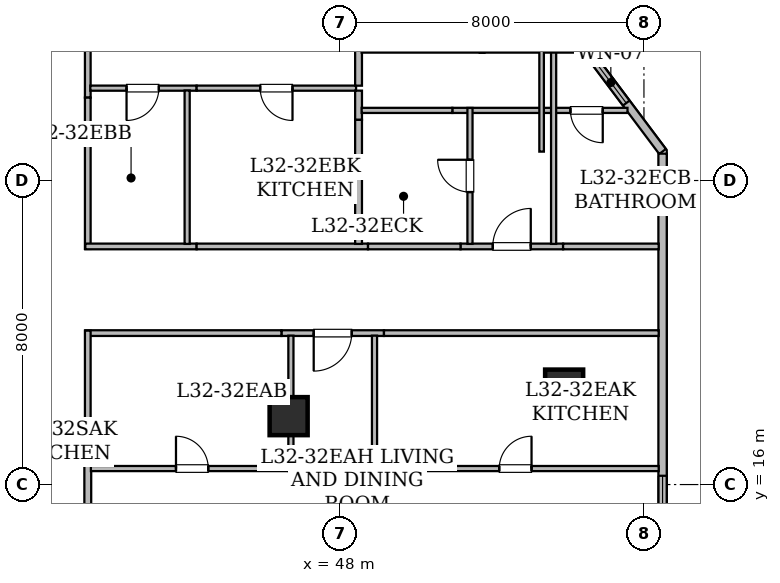
"""IFC4 building model, lengths in metres.
Left out: names, types, materials, properties, quantities, classifications, styles, units other than length and angle.
Written with IfcOpenShell. Run it as: python <this file> out.ifc"""

import sys

from ifc_helpers import new_model, si_unit, direction, frame, frame_2d, origin, origin_2d, place, context, subcontext, project, spatial, rectangle, hollow_rectangle, extrude, element, fill, save


model = new_model("IFC4")
c1 = context("Model", 3, precision=1e-05, world=origin(), true_north=direction((0.0, 1.0)))
c2 = subcontext(c1, "Body", "Model", "MODEL_VIEW")
j1 = project(units=[si_unit("LENGTHUNIT", "METRE"), si_unit("PLANEANGLEUNIT", "RADIAN")], contexts=[c1])
p1 = place(None, origin())
s1 = spatial("IfcSite", under=j1, at=p1, CompositionType="ELEMENT")
p2 = place(p1, origin())
s2 = spatial("IfcBuilding", under=s1, at=p2, CompositionType="ELEMENT")
p3 = place(p2, frame((0.0, 0.0, 127.45)))
s3 = spatial("IfcBuildingStorey", under=s2, at=p3, CompositionType="ELEMENT", Elevation=127.45)
for number, where, z_axis, x_axis in (
    (1, (53.9, 18.525, 0.0), (0.0, 0.0, 1.0), (1.0, 0.0, 0.0)),
    (2, (46.65, 17.8, 0.0), (0.0, 0.0, 1.0), (1.0, 0.0, 0.0)),
):
    element("IfcColumn", number, at=place(p3, frame(where, z_axis=z_axis, x_axis=x_axis)), inside=s3, PredefinedType="COLUMN", context=c2, shape_type="SweptSolid", body=[
        extrude(hollow_rectangle(XDim=1.0, YDim=1.0, WallThickness=0.05, at=origin_2d()), origin(), (0.0, 0.0, 1.0), 3.65),
    ])
p4 = place(p3, frame((54.119, 27.924, 0.0), z_axis=(0.0, 0.0, 1.0), x_axis=(0.600039540588, -0.799970343032, 0.0)))
e3 = element("IfcWall", 3, at=p4, inside=s3, PredefinedType="STANDARD", context=c2, shape_type="SweptSolid", body=[
    extrude(rectangle(XDim=3.952, YDim=0.22, at=frame_2d((1.976, 0.0))), origin(), (0.0, 0.0, 1.0), 3.43),
])
p5 = place(p4, frame((1.008, 0.0, 0.85)))
e4 = element("IfcOpeningElement", 4, at=p5, cuts=e3, PredefinedType="OPENING", context=c2, shape_type="SweptSolid", body=[
    extrude(rectangle(XDim=1.35, YDim=1.5, at=frame_2d((0.675, 0.75))), frame((0.0, 0.12, 0.0), z_axis=(0.0, -1.0, 0.0), x_axis=(1.0, 0.0, 0.0)), (0.0, 0.0, 1.0), 0.24),
])
p6 = place(p3, frame((56.49, 24.707, 0.0), z_axis=(0.0, 0.0, 1.0), x_axis=(0.0, -1.0, 0.0)))
e5 = element("IfcWall", 5, at=p6, inside=s3, PredefinedType="STANDARD", context=c2, shape_type="SweptSolid", body=[
    extrude(rectangle(XDim=14.061, YDim=0.22, at=frame_2d((7.031, 0.0))), origin(), (0.0, 0.0, 1.0), 3.43),
])
p7 = place(p6, frame((8.476, 0.0, 0.8)))
e6 = element("IfcOpeningElement", 6, at=p7, cuts=e5, PredefinedType="OPENING", context=c2, shape_type="SweptSolid", body=[
    extrude(rectangle(XDim=1.2, YDim=1.5, at=frame_2d((0.6, 0.75))), frame((0.0, 0.12, 0.0), z_axis=(0.0, -1.0, 0.0), x_axis=(1.0, 0.0, 0.0)), (0.0, 0.0, 1.0), 0.24),
])
p8 = place(p6, frame((10.746, 0.0, 0.85)))
e7 = element("IfcOpeningElement", 7, at=p8, cuts=e5, PredefinedType="OPENING", context=c2, shape_type="SweptSolid", body=[
    extrude(rectangle(XDim=1.65, YDim=1.55, at=frame_2d((0.825, 0.775))), frame((0.0, 0.12, 0.0), z_axis=(0.0, -1.0, 0.0), x_axis=(1.0, 0.0, 0.0)), (0.0, 0.0, 1.0), 0.24),
])
p9 = place(p3, frame((41.3, 16.835, 0.0), z_axis=(0.0, 0.0, 1.0), x_axis=(-1.0, 0.0, 0.0)))
e8 = element("IfcWall", 8, at=p9, inside=s3, PredefinedType="STANDARD", context=c2, shape_type="SweptSolid", body=[
    extrude(rectangle(XDim=1.636, YDim=0.15, at=frame_2d((0.818, 0.0))), origin(), (0.0, 0.0, 1.0), 3.43),
])
p10 = place(p3, frame((49.159, 19.985, 0.0), z_axis=(0.0, 0.0, 1.0), x_axis=(-1.0, 0.0, 0.0)))
e9 = element("IfcWall", 9, at=p10, inside=s3, PredefinedType="STANDARD", context=c2, shape_type="SweptSolid", body=[
    extrude(rectangle(XDim=2.698, YDim=0.15, at=frame_2d((1.349, 0.0))), origin(), (0.0, 0.0, 1.0), 2.647),
])
p11 = place(p10, frame((0.849, 0.0, 0.0)))
e10 = element("IfcOpeningElement", 10, at=p11, cuts=e9, PredefinedType="OPENING", context=c2, shape_type="SweptSolid", body=[
    extrude(rectangle(XDim=1.0, YDim=2.15, at=frame_2d((0.5, 1.075))), frame((0.0, 0.085, 0.0), z_axis=(0.0, -1.0, 0.0), x_axis=(1.0, 0.0, 0.0)), (0.0, 0.0, 1.0), 0.17),
])
p12 = place(p3, frame((46.461, 19.985, 0.0), z_axis=(0.0, 0.0, 1.0), x_axis=(-1.0, 0.0, 0.0)))
e11 = element("IfcWall", 11, at=p12, inside=s3, PredefinedType="STANDARD", context=c2, shape_type="SweptSolid", body=[
    extrude(rectangle(XDim=5.161, YDim=0.15, at=frame_2d((2.581, 0.0))), origin(), (0.0, 0.0, 1.0), 2.647),
])
p13 = place(p3, frame((41.365, 20.05, 0.0), z_axis=(0.0, 0.0, 1.0), x_axis=(0.0, -1.0, 0.0)))
e12 = element("IfcWall", 12, at=p13, inside=s3, PredefinedType="STANDARD", context=c2, shape_type="SweptSolid", body=[
    extrude(rectangle(XDim=3.15, YDim=0.15, at=frame_2d((1.575, 0.0))), origin(), (0.0, 0.0, 1.0), 2.647),
])
p14 = place(p3, frame((56.388, 19.985, 0.0), z_axis=(0.0, 0.0, 1.0), x_axis=(-1.0, 0.0, 0.0)))
e13 = element("IfcWall", 13, at=p14, inside=s3, PredefinedType="STANDARD", context=c2, shape_type="SweptSolid", body=[
    extrude(rectangle(XDim=7.229, YDim=0.15, at=frame_2d((3.615, 0.0))), origin(), (0.0, 0.0, 1.0), 2.876),
])
p15 = place(p3, frame((41.365, 35.279, 0.0), z_axis=(0.0, 0.0, 1.0), x_axis=(0.0, -1.0, 0.0)))
e14 = element("IfcWall", 14, at=p15, inside=s3, PredefinedType="STANDARD", context=c2, shape_type="SweptSolid", body=[
    extrude(rectangle(XDim=9.098, YDim=0.15, at=frame_2d((4.549, 0.0))), origin(), (0.0, 0.0, 1.0), 3.107),
])
p16 = place(p15, frame((4.049, 0.0, 0.0)))
e15 = element("IfcOpeningElement", 15, at=p16, cuts=e14, PredefinedType="OPENING", context=c2, shape_type="SweptSolid", body=[
    extrude(rectangle(XDim=1.0, YDim=2.15, at=frame_2d((0.5, 1.075))), frame((0.0, 0.085, 0.0), z_axis=(0.0, -1.0, 0.0), x_axis=(1.0, 0.0, 0.0)), (0.0, 0.0, 1.0), 0.17),
])
p17 = place(p3, frame((41.365, 26.181, 0.0), z_axis=(0.0, 0.0, 1.0), x_axis=(0.0, -1.0, 0.0)))
e16 = element("IfcWall", 16, at=p17, inside=s3, PredefinedType="STANDARD", context=c2, shape_type="SweptSolid", body=[
    extrude(rectangle(XDim=3.981, YDim=0.15, at=frame_2d((1.99, 0.0))), origin(), (0.0, 0.0, 1.0), 3.43),
])
p18 = place(p3, frame((41.3, 22.265, 0.0), z_axis=(0.0, 0.0, 1.0), x_axis=(1.0, 0.0, 0.0)))
e17 = element("IfcWall", 17, at=p18, inside=s3, PredefinedType="STANDARD", context=c2, shape_type="SweptSolid", body=[
    extrude(rectangle(XDim=2.929, YDim=0.15, at=frame_2d((1.464, 0.0))), origin(), (0.0, 0.0, 1.0), 3.43),
])
p19 = place(p3, frame((44.229, 22.265, 0.0), z_axis=(0.0, 0.0, 1.0), x_axis=(1.0, 0.0, 0.0)))
e18 = element("IfcWall", 18, at=p19, inside=s3, PredefinedType="STANDARD", context=c2, shape_type="SweptSolid", body=[
    extrude(rectangle(XDim=4.51, YDim=0.15, at=frame_2d((2.255, 0.0))), origin(), (0.0, 0.0, 1.0), 2.647),
])
p20 = place(p3, frame((51.173, 22.265, 0.0), z_axis=(0.0, 0.0, 1.0), x_axis=(1.0, 0.0, 0.0)))
e19 = element("IfcWall", 19, at=p20, inside=s3, PredefinedType="STANDARD", context=c2, shape_type="SweptSolid", body=[
    extrude(rectangle(XDim=2.699, YDim=0.15, at=frame_2d((1.35, 0.0))), origin(), (0.0, 0.0, 1.0), 2.876),
])
p21 = place(p20, frame((0.849, 0.0, 0.0)))
e20 = element("IfcOpeningElement", 20, at=p21, cuts=e19, PredefinedType="OPENING", context=c2, shape_type="SweptSolid", body=[
    extrude(rectangle(XDim=1.0, YDim=2.15, at=frame_2d((0.5, 1.075))), frame((0.0, 0.085, 0.0), z_axis=(0.0, -1.0, 0.0), x_axis=(1.0, 0.0, 0.0)), (0.0, 0.0, 1.0), 0.17),
])
p22 = place(p3, frame((53.872, 22.265, 0.0), z_axis=(0.0, 0.0, 1.0), x_axis=(1.0, 0.0, 0.0)))
e21 = element("IfcWall", 21, at=p22, inside=s3, PredefinedType="STANDARD", context=c2, shape_type="SweptSolid", body=[
    extrude(rectangle(XDim=2.516, YDim=0.15, at=frame_2d((1.258, 0.0))), origin(), (0.0, 0.0, 1.0), 2.876),
])
p23 = place(p3, frame((48.739, 22.265, 0.0), z_axis=(0.0, 0.0, 1.0), x_axis=(1.0, 0.0, 0.0)))
e22 = element("IfcWall", 22, at=p23, inside=s3, PredefinedType="STANDARD", context=c2, shape_type="SweptSolid", body=[
    extrude(rectangle(XDim=2.434, YDim=0.15, at=frame_2d((1.217, 0.0))), origin(), (0.0, 0.0, 1.0), 3.43),
])
p24 = place(p3, frame((41.365, 16.67, 0.0), z_axis=(0.0, 0.0, 1.0), x_axis=(0.0, -1.0, 0.0)))
e23 = element("IfcWall", 23, at=p24, inside=s3, PredefinedType="STANDARD", context=c2, shape_type="SweptSolid", body=[
    extrude(rectangle(XDim=2.078, YDim=0.18, at=frame_2d((1.039, 0.0))), origin(), (0.0, 0.0, 1.0), 3.43),
])
p25 = place(p3, frame((41.447, 16.421, 0.0), z_axis=(0.0, 0.0, 1.0), x_axis=(1.0, 0.0, 0.0)))
e24 = element("IfcWall", 24, at=p25, inside=s3, PredefinedType="PARTITIONING", context=c2, shape_type="SweptSolid", body=[
    extrude(rectangle(XDim=5.328, YDim=0.135, at=frame_2d((2.664, 0.0))), origin(), (0.0, 0.0, 1.0), 3.43),
])
p26 = place(p25, frame((2.239, 0.0, 0.0)))
e25 = element("IfcOpeningElement", 25, at=p26, cuts=e24, PredefinedType="OPENING", context=c2, shape_type="SweptSolid", body=[
    extrude(rectangle(XDim=0.85, YDim=2.1, at=frame_2d((0.425, 1.05))), frame((0.0, 0.077, 0.0), z_axis=(0.0, -1.0, 0.0), x_axis=(1.0, 0.0, 0.0)), (0.0, 0.0, 1.0), 0.155),
])
for number, where, z_axis, x_axis in (
    (26, (46.71, 16.356, 0.0), (0.0, 0.0, 1.0), (0.0, 1.0, 0.0)),
    (27, (48.91, 19.918, 0.0), (0.0, 0.0, 1.0), (0.0, -1.0, 0.0)),
):
    element("IfcWall", number, at=place(p3, frame(where, z_axis=z_axis, x_axis=x_axis)), inside=s3, PredefinedType="PARTITIONING", context=c2, shape_type="SweptSolid", body=[
        extrude(rectangle(XDim=3.562, YDim=0.135, at=frame_2d((1.781, 0.0))), origin(), (0.0, 0.0, 1.0), 2.647),
    ])
p27 = place(p3, frame((48.845, 16.421, 0.0), z_axis=(0.0, 0.0, 1.0), x_axis=(1.0, 0.0, 0.0)))
e28 = element("IfcWall", 28, at=p27, inside=s3, PredefinedType="PARTITIONING", context=c2, shape_type="SweptSolid", body=[
    extrude(rectangle(XDim=7.543, YDim=0.135, at=frame_2d((3.771, 0.0))), origin(), (0.0, 0.0, 1.0), 2.876),
])
p28 = place(p27, frame((3.347, 0.0, 0.0)))
e29 = element("IfcOpeningElement", 29, at=p28, cuts=e28, PredefinedType="OPENING", context=c2, shape_type="SweptSolid", body=[
    extrude(rectangle(XDim=0.85, YDim=2.1, at=frame_2d((0.425, 1.05))), frame((0.0, 0.077, 0.0), z_axis=(0.0, -1.0, 0.0), x_axis=(1.0, 0.0, 0.0)), (0.0, 0.0, 1.0), 0.155),
])
p29 = place(p3, frame((44.229, 26.43, 0.0), z_axis=(0.0, 0.0, 1.0), x_axis=(-1.0, 0.0, 0.0)))
e30 = element("IfcWall", 30, at=p29, inside=s3, PredefinedType="PARTITIONING", context=c2, shape_type="SweptSolid", body=[
    extrude(rectangle(XDim=2.797, YDim=0.135, at=frame_2d((1.398, 0.0))), origin(), (0.0, 0.0, 1.0), 3.43),
])
p30 = place(p29, frame((0.994, 0.0, 0.0)))
e31 = element("IfcOpeningElement", 31, at=p30, cuts=e30, PredefinedType="OPENING", context=c2, shape_type="SweptSolid", body=[
    extrude(rectangle(XDim=0.85, YDim=2.1, at=frame_2d((0.425, 1.05))), frame((0.0, 0.077, 0.0), z_axis=(0.0, -1.0, 0.0), x_axis=(1.0, 0.0, 0.0)), (0.0, 0.0, 1.0), 0.155),
])
p31 = place(p3, frame((48.425, 26.43, 0.0), z_axis=(0.0, 0.0, 1.0), x_axis=(-1.0, 0.0, 0.0)))
e32 = element("IfcWall", 32, at=p31, inside=s3, PredefinedType="PARTITIONING", context=c2, shape_type="SweptSolid", body=[
    extrude(rectangle(XDim=4.196, YDim=0.135, at=frame_2d((2.098, 0.0))), origin(), (0.0, 0.0, 1.0), 2.647),
])
p32 = place(p31, frame((1.673, 0.0, 0.0)))
e33 = element("IfcOpeningElement", 33, at=p32, cuts=e32, PredefinedType="OPENING", context=c2, shape_type="SweptSolid", body=[
    extrude(rectangle(XDim=0.85, YDim=2.1, at=frame_2d((0.425, 1.05))), frame((0.0, 0.077, 0.0), z_axis=(0.0, -1.0, 0.0), x_axis=(1.0, 0.0, 0.0)), (0.0, 0.0, 1.0), 0.155),
])
p33 = place(p3, frame((48.49, 27.674, 0.0), z_axis=(0.0, 0.0, 1.0), x_axis=(0.0, -1.0, 0.0)))
e34 = element("IfcWall", 34, at=p33, inside=s3, PredefinedType="STANDARD", context=c2, shape_type="SweptSolid", body=[
    extrude(rectangle(XDim=1.179, YDim=0.18, at=frame_2d((0.589, 0.0))), origin(), (0.0, 0.0, 1.0), 3.43),
])
p34 = place(p3, frame((43.98, 26.369, 0.0), z_axis=(0.0, 0.0, 1.0), x_axis=(0.0, -1.0, 0.0)))
e35 = element("IfcWall", 35, at=p34, inside=s3, PredefinedType="PARTITIONING", context=c2, shape_type="SweptSolid", body=[
    extrude(rectangle(XDim=4.037, YDim=0.135, at=frame_2d((2.019, 0.0))), origin(), (0.0, 0.0, 1.0), 3.43),
])
p35 = place(p3, frame((48.49, 26.365, 0.0), z_axis=(0.0, 0.0, 1.0), x_axis=(0.0, -1.0, 0.0)))
e36 = element("IfcWall", 36, at=p35, inside=s3, PredefinedType="STANDARD", context=c2, shape_type="SweptSolid", body=[
    extrude(rectangle(XDim=0.769, YDim=0.18, at=frame_2d((0.385, 0.0))), origin(), (0.0, 0.0, 1.0), 3.43),
])
p36 = place(p3, frame((48.49, 25.596, 0.0), z_axis=(0.0, 0.0, 1.0), x_axis=(0.0, -1.0, 0.0)))
e37 = element("IfcWall", 37, at=p36, inside=s3, PredefinedType="STANDARD", context=c2, shape_type="SweptSolid", body=[
    extrude(rectangle(XDim=3.264, YDim=0.18, at=frame_2d((1.632, 0.0))), origin(), (0.0, 0.0, 1.0), 3.43),
])
p37 = place(p3, frame((55.567, 25.845, 0.0), z_axis=(0.0, 0.0, 1.0), x_axis=(-1.0, 0.0, 0.0)))
e38 = element("IfcWall", 38, at=p37, inside=s3, PredefinedType="PARTITIONING", context=c2, shape_type="SweptSolid", body=[
    extrude(rectangle(XDim=4.609, YDim=0.135, at=frame_2d((2.304, 0.0))), origin(), (0.0, 0.0, 1.0), 2.876),
])
p38 = place(p37, frame((0.651, 0.0, 0.0)))
e39 = element("IfcOpeningElement", 39, at=p38, cuts=e38, PredefinedType="OPENING", context=c2, shape_type="SweptSolid", body=[
    extrude(rectangle(XDim=0.85, YDim=2.1, at=frame_2d((0.425, 1.05))), frame((0.0, 0.077, 0.0), z_axis=(0.0, -1.0, 0.0), x_axis=(1.0, 0.0, 0.0)), (0.0, 0.0, 1.0), 0.155),
])
p39 = place(p3, frame((53.623, 28.51, 0.0), z_axis=(0.0, 0.0, 1.0), x_axis=(0.0, -1.0, 0.0)))
e40 = element("IfcWall", 40, at=p39, inside=s3, PredefinedType="PARTITIONING", context=c2, shape_type="SweptSolid", body=[
    extrude(rectangle(XDim=6.178, YDim=0.135, at=frame_2d((3.089, 0.0))), origin(), (0.0, 0.0, 1.0), 2.876),
])
p40 = place(p3, frame((51.422, 22.332, 0.0), z_axis=(0.0, 0.0, 1.0), x_axis=(0.0, 1.0, 0.0)))
e41 = element("IfcWall", 41, at=p40, inside=s3, PredefinedType="PARTITIONING", context=c2, shape_type="SweptSolid", body=[
    extrude(rectangle(XDim=3.578, YDim=0.135, at=frame_2d((1.789, 0.0))), origin(), (0.0, 0.0, 1.0), 3.43),
])
p41 = place(p40, frame((1.364, 0.0, 0.0)))
e42 = element("IfcOpeningElement", 42, at=p41, cuts=e41, PredefinedType="OPENING", context=c2, shape_type="SweptSolid", body=[
    extrude(rectangle(XDim=0.85, YDim=2.1, at=frame_2d((0.425, 1.05))), frame((0.0, 0.077, 0.0), z_axis=(0.0, -1.0, 0.0), x_axis=(1.0, 0.0, 0.0)), (0.0, 0.0, 1.0), 0.155),
])
p42 = place(p3, frame((50.958, 25.845, 0.0), z_axis=(0.0, 0.0, 1.0), x_axis=(-1.0, 0.0, 0.0)))
e43 = element("IfcWall", 43, at=p42, inside=s3, PredefinedType="PARTITIONING", context=c2, shape_type="SweptSolid", body=[
    extrude(rectangle(XDim=2.386, YDim=0.135, at=frame_2d((1.193, 0.0))), origin(), (0.0, 0.0, 1.0), 3.43),
])
p43 = place(p3, frame((51.738, 27.36, 0.0), z_axis=(0.0, 0.0, 1.0), x_axis=(0.0, 1.0, 0.0)))
e44 = element("IfcWall", 44, at=p43, inside=s3, PredefinedType="PARTITIONING", context=c2, shape_type="SweptSolid", body=[
    extrude(rectangle(XDim=8.106, YDim=0.12, at=frame_2d((4.053, 0.0))), origin(), (0.0, 0.0, 1.0), 3.43),
])
p44 = place(p43, frame((3.582, 0.0, 0.0)))
e45 = element("IfcOpeningElement", 45, at=p44, cuts=e44, PredefinedType="OPENING", context=c2, shape_type="SweptSolid", body=[
    extrude(rectangle(XDim=0.9, YDim=2.1, at=frame_2d((0.45, 1.05))), frame((0.0, 0.07, 0.0), z_axis=(0.0, -1.0, 0.0), x_axis=(1.0, 0.0, 0.0)), (0.0, 0.0, 1.0), 0.14),
])
p45 = place(p3, frame((53.307, 37.486, 0.0), z_axis=(0.0, 0.0, 1.0), x_axis=(0.0, -1.0, 0.0)))
e46 = element("IfcWall", 46, at=p45, inside=s3, PredefinedType="PARTITIONING", context=c2, shape_type="SweptSolid", body=[
    extrude(rectangle(XDim=12.726, YDim=0.12, at=frame_2d((6.363, 0.0))), origin(), (0.0, 0.0, 1.0), 2.647),
])
p46 = place(p45, frame((4.705, 0.0, 0.0)))
e47 = element("IfcOpeningElement", 47, at=p46, cuts=e46, PredefinedType="OPENING", context=c2, shape_type="SweptSolid", body=[
    extrude(rectangle(XDim=0.9, YDim=2.1, at=frame_2d((0.45, 1.05))), frame((0.0, 0.07, 0.0), z_axis=(0.0, -1.0, 0.0), x_axis=(1.0, 0.0, 0.0)), (0.0, 0.0, 1.0), 0.14),
])
p47 = place(p7, origin())
e48 = element("IfcWindow", 48, at=p47, inside=s3, PartitioningType="SINGLE_PANEL", PredefinedType="WINDOW", context=c2, shape_type="SweptSolid", body=[
    extrude(rectangle(XDim=1.2, YDim=1.5, at=frame_2d((0.6, 0.75))), frame((0.0, 0.03, 0.0), z_axis=(0.0, -1.0, 0.0), x_axis=(1.0, 0.0, 0.0)), (0.0, 0.0, 1.0), 0.06),
])
fill(e6, e48)
p48 = place(p5, origin())
e49 = element("IfcWindow", 49, at=p48, inside=s3, PartitioningType="SINGLE_PANEL", PredefinedType="WINDOW", context=c2, shape_type="SweptSolid", body=[
    extrude(rectangle(XDim=1.35, YDim=1.5, at=frame_2d((0.675, 0.75))), frame((0.0, 0.03, 0.0), z_axis=(0.0, -1.0, 0.0), x_axis=(1.0, 0.0, 0.0)), (0.0, 0.0, 1.0), 0.06),
])
fill(e4, e49)
p49 = place(p11, origin())
e50 = element("IfcDoor", 50, at=p49, inside=s3, OperationType="SINGLE_SWING_RIGHT", PredefinedType="DOOR", context=c2, shape_type="SweptSolid", body=[
    extrude(rectangle(XDim=1.0, YDim=2.15, at=frame_2d((0.5, 1.075))), frame((0.0, 0.025, 0.0), z_axis=(0.0, -1.0, 0.0), x_axis=(1.0, 0.0, 0.0)), (0.0, 0.0, 1.0), 0.05),
])
fill(e10, e50)
p50 = place(p21, origin())
e51 = element("IfcDoor", 51, at=p50, inside=s3, OperationType="SINGLE_SWING_RIGHT", PredefinedType="DOOR", context=c2, shape_type="SweptSolid", body=[
    extrude(rectangle(XDim=1.0, YDim=2.15, at=frame_2d((0.5, 1.075))), frame((0.0, 0.025, 0.0), z_axis=(0.0, -1.0, 0.0), x_axis=(1.0, 0.0, 0.0)), (0.0, 0.0, 1.0), 0.05),
])
fill(e20, e51)
p51 = place(p26, origin())
e52 = element("IfcDoor", 52, at=p51, inside=s3, OperationType="SINGLE_SWING_LEFT", PredefinedType="DOOR", context=c2, shape_type="SweptSolid", body=[
    extrude(rectangle(XDim=0.85, YDim=2.1, at=frame_2d((0.425, 1.05))), frame((0.0, 0.025, 0.0), z_axis=(0.0, -1.0, 0.0), x_axis=(1.0, 0.0, 0.0)), (0.0, 0.0, 1.0), 0.05),
])
fill(e25, e52)
p52 = place(p28, origin())
e53 = element("IfcDoor", 53, at=p52, inside=s3, OperationType="SINGLE_SWING_RIGHT", PredefinedType="DOOR", context=c2, shape_type="SweptSolid", body=[
    extrude(rectangle(XDim=0.85, YDim=2.1, at=frame_2d((0.425, 1.05))), frame((0.0, 0.025, 0.0), z_axis=(0.0, -1.0, 0.0), x_axis=(1.0, 0.0, 0.0)), (0.0, 0.0, 1.0), 0.05),
])
fill(e29, e53)
p53 = place(p30, origin())
e54 = element("IfcDoor", 54, at=p53, inside=s3, OperationType="SINGLE_SWING_RIGHT", PredefinedType="DOOR", context=c2, shape_type="SweptSolid", body=[
    extrude(rectangle(XDim=0.85, YDim=2.1, at=frame_2d((0.425, 1.05))), frame((0.0, 0.025, 0.0), z_axis=(0.0, -1.0, 0.0), x_axis=(1.0, 0.0, 0.0)), (0.0, 0.0, 1.0), 0.05),
])
fill(e31, e54)
p54 = place(p32, origin())
e55 = element("IfcDoor", 55, at=p54, inside=s3, OperationType="SINGLE_SWING_LEFT", PredefinedType="DOOR", context=c2, shape_type="SweptSolid", body=[
    extrude(rectangle(XDim=0.85, YDim=2.1, at=frame_2d((0.425, 1.05))), frame((0.0, 0.025, 0.0), z_axis=(0.0, -1.0, 0.0), x_axis=(1.0, 0.0, 0.0)), (0.0, 0.0, 1.0), 0.05),
])
fill(e33, e55)
p55 = place(p38, origin())
e56 = element("IfcDoor", 56, at=p55, inside=s3, OperationType="SINGLE_SWING_LEFT", PredefinedType="DOOR", context=c2, shape_type="SweptSolid", body=[
    extrude(rectangle(XDim=0.85, YDim=2.1, at=frame_2d((0.425, 1.05))), frame((0.0, 0.025, 0.0), z_axis=(0.0, -1.0, 0.0), x_axis=(1.0, 0.0, 0.0)), (0.0, 0.0, 1.0), 0.05),
])
fill(e39, e56)
p56 = place(p41, origin())
e57 = element("IfcDoor", 57, at=p56, inside=s3, OperationType="SINGLE_SWING_RIGHT", PredefinedType="DOOR", context=c2, shape_type="SweptSolid", body=[
    extrude(rectangle(XDim=0.85, YDim=2.1, at=frame_2d((0.425, 1.05))), frame((0.0, 0.025, 0.0), z_axis=(0.0, -1.0, 0.0), x_axis=(1.0, 0.0, 0.0)), (0.0, 0.0, 1.0), 0.05),
])
fill(e42, e57)
save(model, sys.argv[1])
